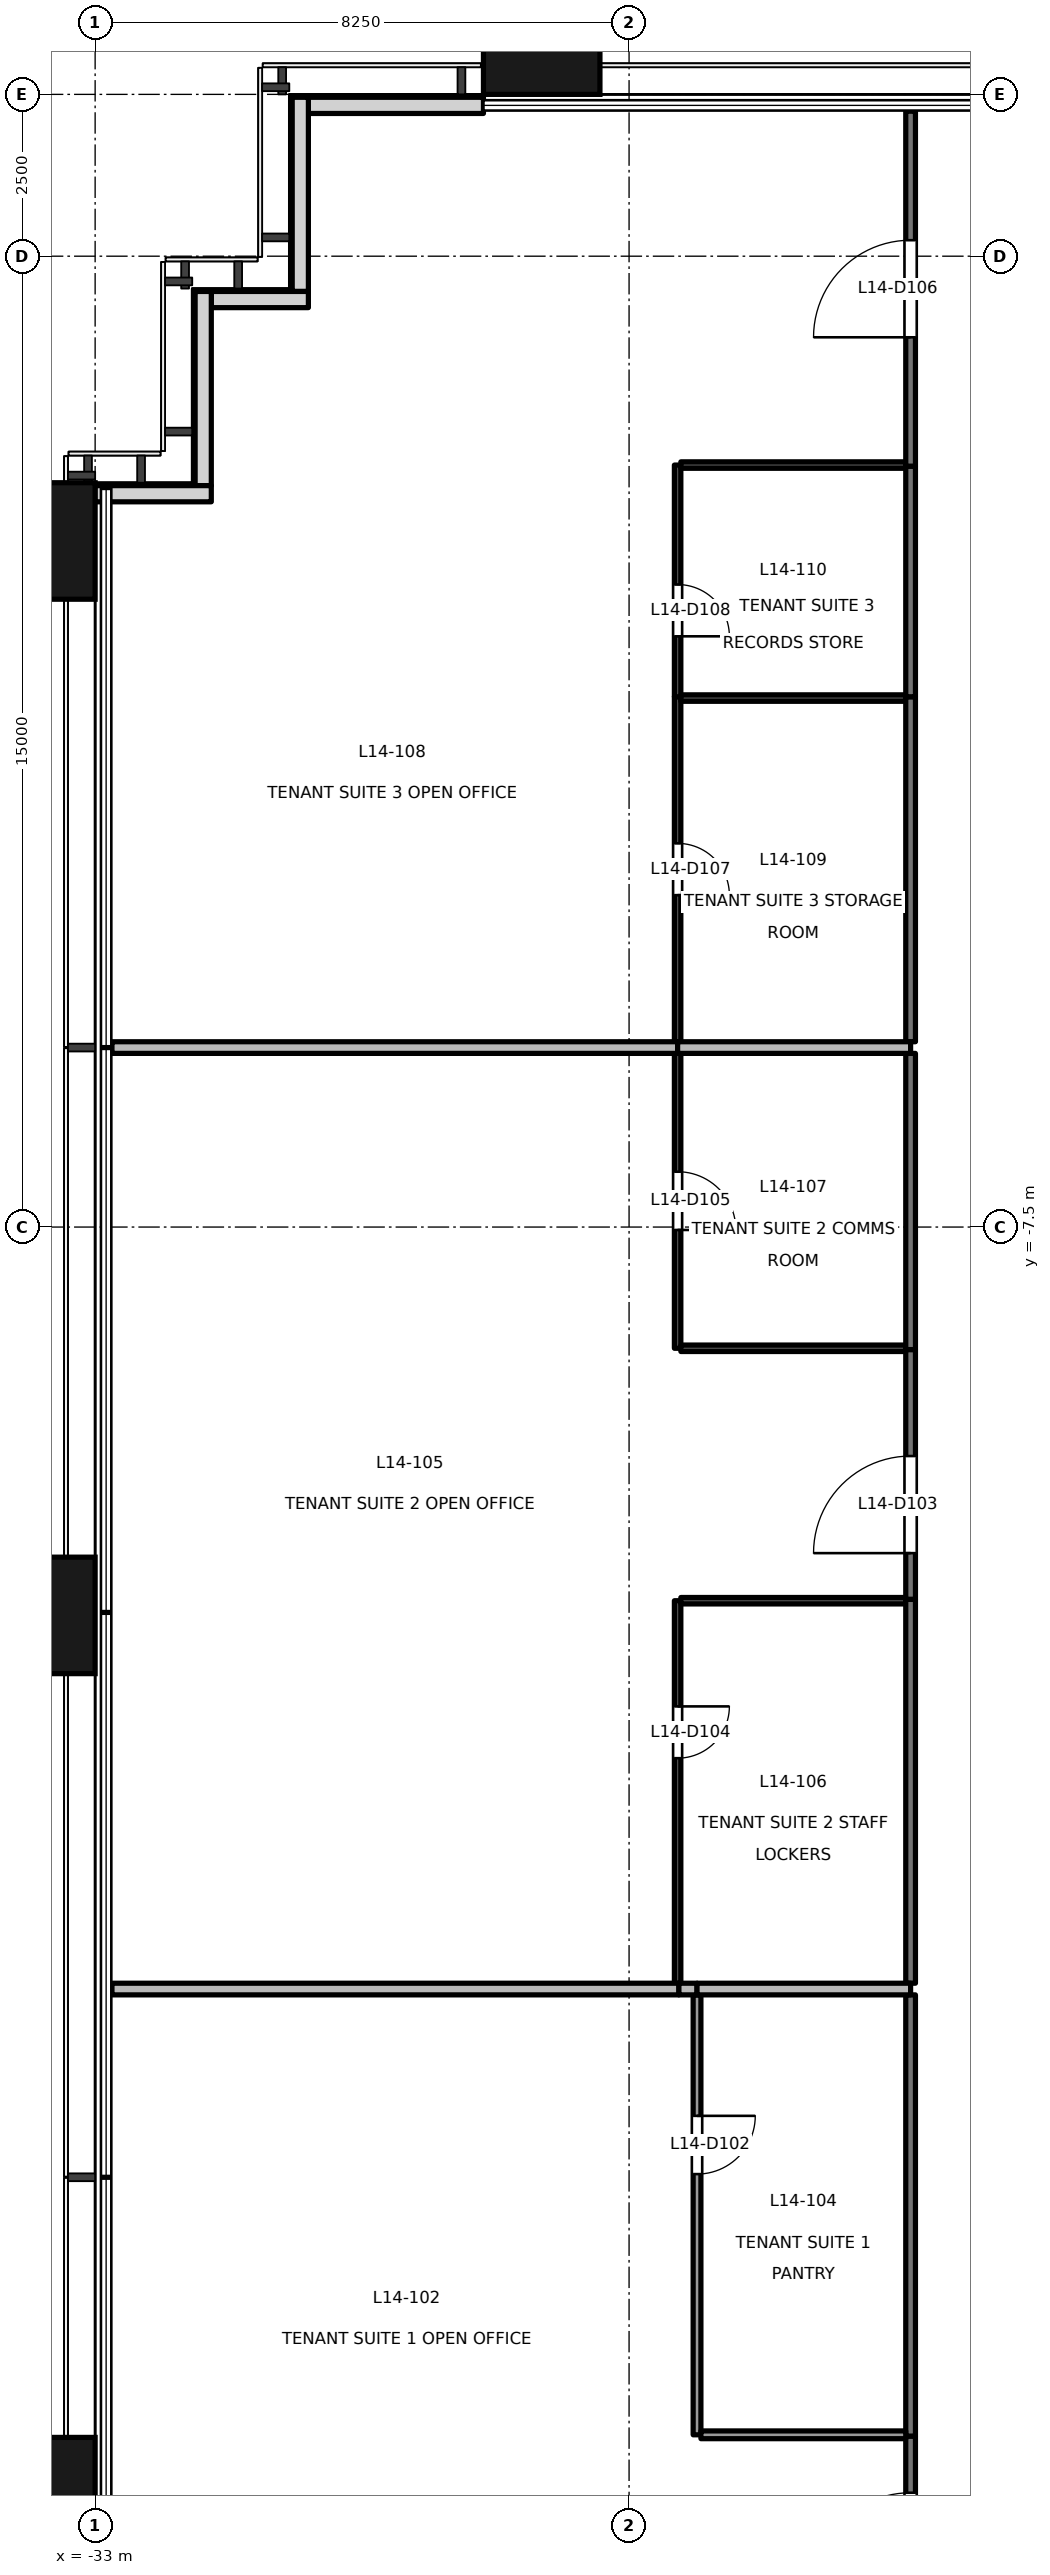
"""IFC4 building model, lengths in metres.
Left out: names, types, materials, properties, quantities, classifications, styles, units other than length and angle.
Written with IfcOpenShell. Run it as: python <this file> out.ifc"""

import sys

from ifc_helpers import new_model, si_unit, direction, frame, frame_2d, origin, origin_2d, place, context, subcontext, project, spatial, rectangle, extrude, element, fill, save


model = new_model("IFC4")
c1 = context("Model", 3, precision=1e-05, world=origin(), true_north=direction((0.0, 1.0)))
c2 = subcontext(c1, "Body", "Model", "MODEL_VIEW")
j1 = project(units=[si_unit("LENGTHUNIT", "METRE"), si_unit("PLANEANGLEUNIT", "RADIAN")], contexts=[c1])
p1 = place(None, origin())
s1 = spatial("IfcSite", under=j1, at=p1, CompositionType="ELEMENT")
p2 = place(p1, origin())
s2 = spatial("IfcBuilding", under=s1, at=p2, CompositionType="ELEMENT")
p3 = place(p2, frame((0.0, 0.0, 65.2)))
s3 = spatial("IfcBuildingStorey", under=s2, at=p3, CompositionType="ELEMENT", Elevation=65.2)
for number, where, z_axis, x_axis in (
    (1, (-33.9, -27.1, -0.2), (0.0, 0.0, 1.0), (0.0, 1.0, 0.0)),
    (2, (-33.9, -13.5, -0.2), (0.0, 0.0, 1.0), (0.0, 1.0, 0.0)),
    (3, (-33.9, 3.1, -0.2), (0.0, 0.0, 1.0), (0.0, 1.0, 0.0)),
    (4, (-26.1, 10.9, -0.2), (0.0, 0.0, 1.0), (1.0, 0.0, 0.0)),
):
    element("IfcColumn", number, at=place(p3, frame(where, z_axis=z_axis, x_axis=x_axis)), inside=s3, PredefinedType="COLUMN", context=c2, shape_type="SweptSolid", body=[
        extrude(rectangle(XDim=1.8, YDim=1.8, at=origin_2d()), origin(), (0.0, 0.0, 1.0), 4.1),
    ])
p4 = place(p3, frame((-27.0, 9.83, 0.0), z_axis=(0.0, 0.0, 1.0), x_axis=(-1.0, 0.0, 0.0)))
e5 = element("IfcWall", 5, at=p4, inside=s3, PredefinedType="SOLIDWALL", context=c2, shape_type="SweptSolid", body=[
    extrude(rectangle(XDim=2.705, YDim=0.25, at=frame_2d((1.353, 0.0))), origin(), (0.0, 0.0, 1.0), 3.9),
])
p5 = place(p3, frame((-29.83, 9.955, 0.0), z_axis=(0.0, 0.0, 1.0), x_axis=(0.0, -1.0, 0.0)))
e6 = element("IfcWall", 6, at=p5, inside=s3, PredefinedType="SOLIDWALL", context=c2, shape_type="SweptSolid", body=[
    extrude(rectangle(XDim=3.0, YDim=0.25, at=frame_2d((1.5, 0.0))), origin(), (0.0, 0.0, 1.0), 3.9),
])
p6 = place(p3, frame((-29.705, 6.83, 0.0), z_axis=(0.0, 0.0, 1.0), x_axis=(-1.0, 0.0, 0.0)))
e7 = element("IfcWall", 7, at=p6, inside=s3, PredefinedType="SOLIDWALL", context=c2, shape_type="SweptSolid", body=[
    extrude(rectangle(XDim=1.5, YDim=0.25, at=frame_2d((0.75, 0.0))), origin(), (0.0, 0.0, 1.0), 3.9),
])
p7 = place(p3, frame((-31.33, 6.955, 0.0), z_axis=(0.0, 0.0, 1.0), x_axis=(0.0, -1.0, 0.0)))
e8 = element("IfcWall", 8, at=p7, inside=s3, PredefinedType="SOLIDWALL", context=c2, shape_type="SweptSolid", body=[
    extrude(rectangle(XDim=3.0, YDim=0.25, at=frame_2d((1.5, 0.0))), origin(), (0.0, 0.0, 1.0), 3.9),
])
p8 = place(p3, frame((-31.205, 3.83, 0.0), z_axis=(0.0, 0.0, 1.0), x_axis=(-1.0, 0.0, 0.0)))
e9 = element("IfcWall", 9, at=p8, inside=s3, PredefinedType="SOLIDWALL", context=c2, shape_type="SweptSolid", body=[
    extrude(rectangle(XDim=1.8, YDim=0.25, at=frame_2d((0.9, 0.0))), origin(), (0.0, 0.0, 1.0), 3.9),
])
p9 = place(p3, frame((-20.4, -30.68, 0.0), z_axis=(0.0, 0.0, 1.0), x_axis=(0.0, 1.0, 0.0)))
e10 = element("IfcWall", 10, at=p9, inside=s3, PredefinedType="PARTITIONING", context=c2, shape_type="SweptSolid", body=[
    extrude(rectangle(XDim=4.5, YDim=0.15, at=frame_2d((2.25, 0.0))), origin(), (0.0, 0.0, 1.0), 3.3),
])
p10 = place(p9, frame((2.125, 0.0, 0.0)))
e11 = element("IfcOpeningElement", 11, at=p10, cuts=e10, PredefinedType="OPENING", context=c2, shape_type="SweptSolid", body=[
    extrude(rectangle(XDim=1.5, YDim=2.1, at=frame_2d((0.75, 1.05))), frame((0.0, 0.085, 0.0), z_axis=(0.0, -1.0, 0.0), x_axis=(1.0, 0.0, 0.0)), (0.0, 0.0, 1.0), 0.171),
])
p11 = place(p3, frame((-20.4, -26.18, 0.0), z_axis=(0.0, 0.0, 1.0), x_axis=(0.0, 1.0, 0.0)))
e12 = element("IfcWall", 12, at=p11, inside=s3, PredefinedType="PARTITIONING", context=c2, shape_type="SweptSolid", body=[
    extrude(rectangle(XDim=6.817, YDim=0.15, at=frame_2d((3.408, 0.0))), origin(), (0.0, 0.0, 1.0), 3.3),
])
p12 = place(p3, frame((-20.4, -13.253, 0.0), z_axis=(0.0, 0.0, 1.0), x_axis=(0.0, 1.0, 0.0)))
e13 = element("IfcWall", 13, at=p12, inside=s3, PredefinedType="PARTITIONING", context=c2, shape_type="SweptSolid", body=[
    extrude(rectangle(XDim=3.86, YDim=0.15, at=frame_2d((1.93, 0.0))), origin(), (0.0, 0.0, 1.0), 3.9),
])
p13 = place(p12, frame((0.715, 0.0, 0.0)))
e14 = element("IfcOpeningElement", 14, at=p13, cuts=e13, PredefinedType="OPENING", context=c2, shape_type="SweptSolid", body=[
    extrude(rectangle(XDim=1.5, YDim=2.1, at=frame_2d((0.75, 1.05))), frame((0.0, 0.085, 0.0), z_axis=(0.0, -1.0, 0.0), x_axis=(1.0, 0.0, 0.0)), (0.0, 0.0, 1.0), 0.171),
])
p14 = place(p3, frame((-20.4, -19.183, 0.0), z_axis=(0.0, 0.0, 1.0), x_axis=(0.0, 1.0, 0.0)))
e15 = element("IfcWall", 15, at=p14, inside=s3, PredefinedType="PARTITIONING", context=c2, shape_type="SweptSolid", body=[
    extrude(rectangle(XDim=5.93, YDim=0.15, at=frame_2d((2.965, 0.0))), origin(), (0.0, 0.0, 1.0), 3.3),
])
p15 = place(p3, frame((-20.4, -9.393, 0.0), z_axis=(0.0, 0.0, 1.0), x_axis=(0.0, 1.0, 0.0)))
e16 = element("IfcWall", 16, at=p15, inside=s3, PredefinedType="PARTITIONING", context=c2, shape_type="SweptSolid", body=[
    extrude(rectangle(XDim=4.576, YDim=0.15, at=frame_2d((2.288, 0.0))), origin(), (0.0, 0.0, 1.0), 3.3),
])
p16 = place(p3, frame((-20.4, 4.253, 0.0), z_axis=(0.0, 0.0, 1.0), x_axis=(0.0, 1.0, 0.0)))
e17 = element("IfcWall", 17, at=p16, inside=s3, PredefinedType="PARTITIONING", context=c2, shape_type="SweptSolid", body=[
    extrude(rectangle(XDim=5.487, YDim=0.15, at=frame_2d((2.744, 0.0))), origin(), (0.0, 0.0, 1.0), 3.9),
])
p17 = place(p16, frame((1.994, 0.0, 0.0)))
e18 = element("IfcOpeningElement", 18, at=p17, cuts=e17, PredefinedType="OPENING", context=c2, shape_type="SweptSolid", body=[
    extrude(rectangle(XDim=1.5, YDim=2.1, at=frame_2d((0.75, 1.05))), frame((0.0, 0.085, 0.0), z_axis=(0.0, -1.0, 0.0), x_axis=(1.0, 0.0, 0.0)), (0.0, 0.0, 1.0), 0.171),
])
p18 = place(p3, frame((-20.4, -4.637, 0.0), z_axis=(0.0, 0.0, 1.0), x_axis=(0.0, 1.0, 0.0)))
e19 = element("IfcWall", 19, at=p18, inside=s3, PredefinedType="PARTITIONING", context=c2, shape_type="SweptSolid", body=[
    extrude(rectangle(XDim=5.33, YDim=0.15, at=frame_2d((2.665, 0.0))), origin(), (0.0, 0.0, 1.0), 3.3),
])
p19 = place(p3, frame((-20.4, 0.693, 0.0), z_axis=(0.0, 0.0, 1.0), x_axis=(0.0, 1.0, 0.0)))
e20 = element("IfcWall", 20, at=p19, inside=s3, PredefinedType="PARTITIONING", context=c2, shape_type="SweptSolid", body=[
    extrude(rectangle(XDim=3.56, YDim=0.15, at=frame_2d((1.78, 0.0))), origin(), (0.0, 0.0, 1.0), 3.9),
])
p20 = place(p3, frame((-23.7, -19.363, 0.0), z_axis=(0.0, 0.0, 1.0), x_axis=(0.0, -1.0, 0.0)))
e21 = element("IfcWall", 21, at=p20, inside=s3, PredefinedType="PARTITIONING", context=c2, shape_type="SweptSolid", body=[
    extrude(rectangle(XDim=6.797, YDim=0.12, at=frame_2d((3.398, 0.0))), origin(), (0.0, 0.0, 1.0), 3.3),
])
p21 = place(p20, frame((1.869, 0.0, 0.0)))
e22 = element("IfcOpeningElement", 22, at=p21, cuts=e21, PredefinedType="OPENING", context=c2, shape_type="SweptSolid", body=[
    extrude(rectangle(XDim=0.9, YDim=2.1, at=frame_2d((0.45, 1.05))), frame((0.0, 0.071, 0.0), z_axis=(0.0, -1.0, 0.0), x_axis=(1.0, 0.0, 0.0)), (0.0, 0.0, 1.0), 0.141),
])
p22 = place(p3, frame((-23.64, -26.16, 0.0), z_axis=(0.0, 0.0, 1.0), x_axis=(1.0, 0.0, 0.0)))
e23 = element("IfcWall", 23, at=p22, inside=s3, PredefinedType="PARTITIONING", context=c2, shape_type="SweptSolid", body=[
    extrude(rectangle(XDim=3.165, YDim=0.12, at=frame_2d((1.583, 0.0))), origin(), (0.0, 0.0, 1.0), 3.9),
])
p23 = place(p3, frame((-32.74, -19.273, 0.0), z_axis=(0.0, 0.0, 1.0), x_axis=(1.0, 0.0, 0.0)))
e24 = element("IfcWall", 24, at=p23, inside=s3, PredefinedType="PARTITIONING", context=c2, shape_type="SweptSolid", body=[
    extrude(rectangle(XDim=8.76, YDim=0.18, at=frame_2d((4.38, 0.0))), origin(), (0.0, 0.0, 1.0), 3.9),
])
p24 = place(p3, frame((-23.98, -19.273, 0.0), z_axis=(0.0, 0.0, 1.0), x_axis=(1.0, 0.0, 0.0)))
e25 = element("IfcWall", 25, at=p24, inside=s3, PredefinedType="PARTITIONING", context=c2, shape_type="SweptSolid", body=[
    extrude(rectangle(XDim=0.28, YDim=0.18, at=frame_2d((0.14, 0.0))), origin(), (0.0, 0.0, 1.0), 3.9),
])
p25 = place(p3, frame((-23.7, -19.273, 0.0), z_axis=(0.0, 0.0, 1.0), x_axis=(1.0, 0.0, 0.0)))
e26 = element("IfcWall", 26, at=p25, inside=s3, PredefinedType="PARTITIONING", context=c2, shape_type="SweptSolid", body=[
    extrude(rectangle(XDim=3.3, YDim=0.18, at=frame_2d((1.65, 0.0))), origin(), (0.0, 0.0, 1.0), 3.9),
])
p26 = place(p3, frame((-24.0, -13.273, 0.0), z_axis=(0.0, 0.0, 1.0), x_axis=(0.0, -1.0, 0.0)))
e27 = element("IfcWall", 27, at=p26, inside=s3, PredefinedType="PARTITIONING", context=c2, shape_type="SweptSolid", body=[
    extrude(rectangle(XDim=5.91, YDim=0.1, at=frame_2d((2.955, 0.0))), origin(), (0.0, 0.0, 1.0), 3.3),
])
p27 = place(p26, frame((1.633, 0.0, 0.0)))
e28 = element("IfcOpeningElement", 28, at=p27, cuts=e27, PredefinedType="OPENING", context=c2, shape_type="SweptSolid", body=[
    extrude(rectangle(XDim=0.8, YDim=2.1, at=frame_2d((0.4, 1.05))), frame((0.0, 0.061, 0.0), z_axis=(0.0, -1.0, 0.0), x_axis=(1.0, 0.0, 0.0)), (0.0, 0.0, 1.0), 0.121),
])
p28 = place(p3, frame((-20.475, -13.273, 0.0), z_axis=(0.0, 0.0, 1.0), x_axis=(-1.0, 0.0, 0.0)))
e29 = element("IfcWall", 29, at=p28, inside=s3, PredefinedType="PARTITIONING", context=c2, shape_type="SweptSolid", body=[
    extrude(rectangle(XDim=3.475, YDim=0.1, at=frame_2d((1.737, 0.0))), origin(), (0.0, 0.0, 1.0), 3.9),
])
p29 = place(p3, frame((-24.0, -4.817, 0.0), z_axis=(0.0, 0.0, 1.0), x_axis=(0.0, -1.0, 0.0)))
e30 = element("IfcWall", 30, at=p29, inside=s3, PredefinedType="PARTITIONING", context=c2, shape_type="SweptSolid", body=[
    extrude(rectangle(XDim=4.556, YDim=0.1, at=frame_2d((2.278, 0.0))), origin(), (0.0, 0.0, 1.0), 3.3),
])
p30 = place(p29, frame((1.828, 0.0, 0.0)))
e31 = element("IfcOpeningElement", 31, at=p30, cuts=e30, PredefinedType="OPENING", context=c2, shape_type="SweptSolid", body=[
    extrude(rectangle(XDim=0.9, YDim=2.1, at=frame_2d((0.45, 1.05))), frame((0.0, 0.061, 0.0), z_axis=(0.0, -1.0, 0.0), x_axis=(1.0, 0.0, 0.0)), (0.0, 0.0, 1.0), 0.121),
])
p31 = place(p3, frame((-23.95, -9.373, 0.0), z_axis=(0.0, 0.0, 1.0), x_axis=(1.0, 0.0, 0.0)))
e32 = element("IfcWall", 32, at=p31, inside=s3, PredefinedType="PARTITIONING", context=c2, shape_type="SweptSolid", body=[
    extrude(rectangle(XDim=3.475, YDim=0.1, at=frame_2d((1.737, 0.0))), origin(), (0.0, 0.0, 1.0), 3.9),
])
p32 = place(p3, frame((-32.74, -4.727, 0.0), z_axis=(0.0, 0.0, 1.0), x_axis=(1.0, 0.0, 0.0)))
e33 = element("IfcWall", 33, at=p32, inside=s3, PredefinedType="PARTITIONING", context=c2, shape_type="SweptSolid", body=[
    extrude(rectangle(XDim=8.74, YDim=0.18, at=frame_2d((4.37, 0.0))), origin(), (0.0, 0.0, 1.0), 3.3),
])
p33 = place(p3, frame((-24.0, -4.727, 0.0), z_axis=(0.0, 0.0, 1.0), x_axis=(1.0, 0.0, 0.0)))
e34 = element("IfcWall", 34, at=p33, inside=s3, PredefinedType="PARTITIONING", context=c2, shape_type="SweptSolid", body=[
    extrude(rectangle(XDim=3.6, YDim=0.18, at=frame_2d((1.8, 0.0))), origin(), (0.0, 0.0, 1.0), 3.3),
])
p34 = place(p3, frame((-24.0, 0.693, 0.0), z_axis=(0.0, 0.0, 1.0), x_axis=(0.0, -1.0, 0.0)))
e35 = element("IfcWall", 35, at=p34, inside=s3, PredefinedType="PARTITIONING", context=c2, shape_type="SweptSolid", body=[
    extrude(rectangle(XDim=5.33, YDim=0.1, at=frame_2d((2.665, 0.0))), origin(), (0.0, 0.0, 1.0), 3.3),
])
p35 = place(p34, frame((2.265, 0.0, 0.0)))
e36 = element("IfcOpeningElement", 36, at=p35, cuts=e35, PredefinedType="OPENING", context=c2, shape_type="SweptSolid", body=[
    extrude(rectangle(XDim=0.8, YDim=2.1, at=frame_2d((0.4, 1.05))), frame((0.0, 0.061, 0.0), z_axis=(0.0, -1.0, 0.0), x_axis=(1.0, 0.0, 0.0)), (0.0, 0.0, 1.0), 0.121),
])
p36 = place(p3, frame((-24.0, 4.273, 0.0), z_axis=(0.0, 0.0, 1.0), x_axis=(0.0, -1.0, 0.0)))
e37 = element("IfcWall", 37, at=p36, inside=s3, PredefinedType="PARTITIONING", context=c2, shape_type="SweptSolid", body=[
    extrude(rectangle(XDim=3.58, YDim=0.1, at=frame_2d((1.79, 0.0))), origin(), (0.0, 0.0, 1.0), 3.9),
])
p37 = place(p36, frame((1.846, 0.0, 0.0)))
e38 = element("IfcOpeningElement", 38, at=p37, cuts=e37, PredefinedType="OPENING", context=c2, shape_type="SweptSolid", body=[
    extrude(rectangle(XDim=0.8, YDim=2.1, at=frame_2d((0.4, 1.05))), frame((0.0, 0.061, 0.0), z_axis=(0.0, -1.0, 0.0), x_axis=(1.0, 0.0, 0.0)), (0.0, 0.0, 1.0), 0.121),
])
for number, where, z_axis, x_axis in (
    (39, (-20.475, 4.273, 0.0), (0.0, 0.0, 1.0), (-1.0, 0.0, 0.0)),
    (40, (-23.95, 0.673, 0.0), (0.0, 0.0, 1.0), (1.0, 0.0, 0.0)),
):
    element("IfcWall", number, at=place(p3, frame(where, z_axis=z_axis, x_axis=x_axis)), inside=s3, PredefinedType="PARTITIONING", context=c2, shape_type="SweptSolid", body=[
        extrude(rectangle(XDim=3.475, YDim=0.1, at=frame_2d((1.737, 0.0))), origin(), (0.0, 0.0, 1.0), 3.9),
    ])
p38 = place(p10, origin())
e41 = element("IfcDoor", 41, at=p38, inside=s3, OperationType="DOUBLE_DOOR_SINGLE_SWING", PredefinedType="DOOR", context=c2, shape_type="SweptSolid", body=[
    extrude(rectangle(XDim=1.5, YDim=2.1, at=frame_2d((0.75, 1.05))), frame((0.0, 0.025, 0.0), z_axis=(0.0, -1.0, 0.0), x_axis=(1.0, 0.0, 0.0)), (0.0, 0.0, 1.0), 0.05),
])
fill(e11, e41)
p39 = place(p21, origin())
e42 = element("IfcDoor", 42, at=p39, inside=s3, OperationType="SINGLE_SWING_LEFT", PredefinedType="DOOR", context=c2, shape_type="SweptSolid", body=[
    extrude(rectangle(XDim=0.9, YDim=2.1, at=frame_2d((0.45, 1.05))), frame((0.0, 0.025, 0.0), z_axis=(0.0, -1.0, 0.0), x_axis=(1.0, 0.0, 0.0)), (0.0, 0.0, 1.0), 0.05),
])
fill(e22, e42)
p40 = place(p13, origin())
e43 = element("IfcDoor", 43, at=p40, inside=s3, OperationType="DOUBLE_DOOR_SINGLE_SWING", PredefinedType="DOOR", context=c2, shape_type="SweptSolid", body=[
    extrude(rectangle(XDim=1.5, YDim=2.1, at=frame_2d((0.75, 1.05))), frame((0.0, 0.025, 0.0), z_axis=(0.0, -1.0, 0.0), x_axis=(1.0, 0.0, 0.0)), (0.0, 0.0, 1.0), 0.05),
])
fill(e14, e43)
p41 = place(p27, origin())
e44 = element("IfcDoor", 44, at=p41, inside=s3, OperationType="SINGLE_SWING_LEFT", PredefinedType="DOOR", context=c2, shape_type="SweptSolid", body=[
    extrude(rectangle(XDim=0.8, YDim=2.1, at=frame_2d((0.4, 1.05))), frame((0.0, 0.025, 0.0), z_axis=(0.0, -1.0, 0.0), x_axis=(1.0, 0.0, 0.0)), (0.0, 0.0, 1.0), 0.05),
])
fill(e28, e44)
p42 = place(p30, origin())
e45 = element("IfcDoor", 45, at=p42, inside=s3, OperationType="SINGLE_SWING_RIGHT", PredefinedType="DOOR", context=c2, shape_type="SweptSolid", body=[
    extrude(rectangle(XDim=0.9, YDim=2.1, at=frame_2d((0.45, 1.05))), frame((0.0, 0.025, 0.0), z_axis=(0.0, -1.0, 0.0), x_axis=(1.0, 0.0, 0.0)), (0.0, 0.0, 1.0), 0.05),
])
fill(e31, e45)
p43 = place(p17, origin())
e46 = element("IfcDoor", 46, at=p43, inside=s3, OperationType="DOUBLE_DOOR_SINGLE_SWING", PredefinedType="DOOR", context=c2, shape_type="SweptSolid", body=[
    extrude(rectangle(XDim=1.5, YDim=2.1, at=frame_2d((0.75, 1.05))), frame((0.0, 0.025, 0.0), z_axis=(0.0, -1.0, 0.0), x_axis=(1.0, 0.0, 0.0)), (0.0, 0.0, 1.0), 0.05),
])
fill(e18, e46)
p44 = place(p35, origin())
e47 = element("IfcDoor", 47, at=p44, inside=s3, OperationType="SINGLE_SWING_RIGHT", PredefinedType="DOOR", context=c2, shape_type="SweptSolid", body=[
    extrude(rectangle(XDim=0.8, YDim=2.1, at=frame_2d((0.4, 1.05))), frame((0.0, 0.025, 0.0), z_axis=(0.0, -1.0, 0.0), x_axis=(1.0, 0.0, 0.0)), (0.0, 0.0, 1.0), 0.05),
])
fill(e36, e47)
p45 = place(p37, origin())
e48 = element("IfcDoor", 48, at=p45, inside=s3, OperationType="SINGLE_SWING_RIGHT", PredefinedType="DOOR", context=c2, shape_type="SweptSolid", body=[
    extrude(rectangle(XDim=0.8, YDim=2.1, at=frame_2d((0.4, 1.05))), frame((0.0, 0.025, 0.0), z_axis=(0.0, -1.0, 0.0), x_axis=(1.0, 0.0, 0.0)), (0.0, 0.0, 1.0), 0.05),
])
fill(e38, e48)
save(model, sys.argv[1])
